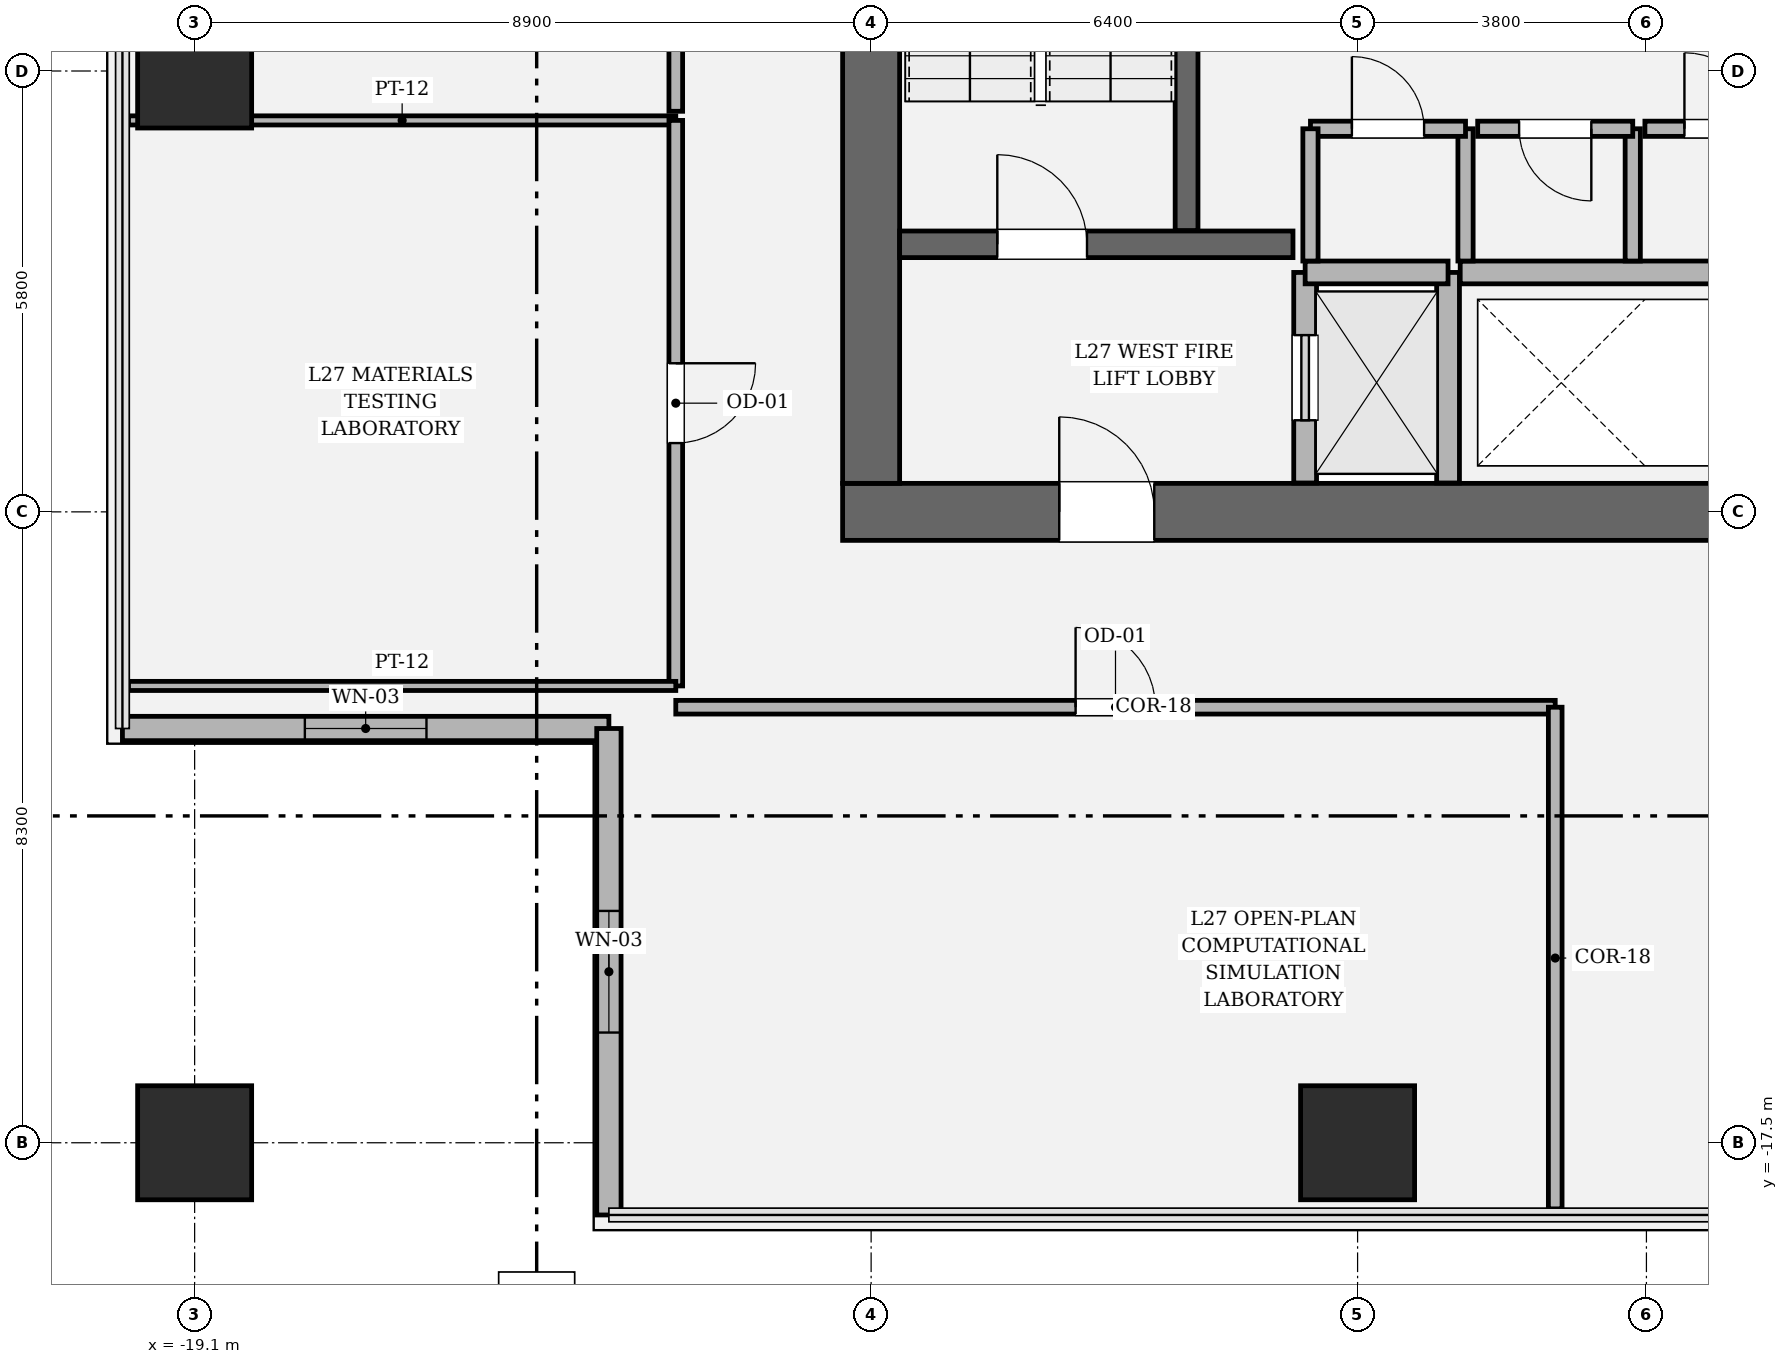
"""IFC4 building model, lengths in metres.
Left out: names, types, materials, properties, quantities, classifications, styles, units other than length and angle.
Written with IfcOpenShell. Run it as: python <this file> out.ifc"""

import sys

from ifc_helpers import new_model, si_unit, direction, frame, frame_2d, origin, origin_2d, place, context, subcontext, project, spatial, rectangle, hollow_rectangle, extrude, element, fill, save


model = new_model("IFC4")
c1 = context("Model", 3, precision=1e-05, world=origin(), true_north=direction((0.0, 1.0)))
c2 = subcontext(c1, "Body", "Model", "MODEL_VIEW")
j1 = project(units=[si_unit("LENGTHUNIT", "METRE"), si_unit("PLANEANGLEUNIT", "RADIAN")], contexts=[c1])
p1 = place(None, origin())
s1 = spatial("IfcSite", under=j1, at=p1, CompositionType="ELEMENT")
p2 = place(p1, origin())
s2 = spatial("IfcBuilding", under=s1, at=p2, CompositionType="ELEMENT")
p3 = place(p2, frame((0.0, 0.0, 117.3)))
s3 = spatial("IfcBuildingStorey", under=s2, at=p3, CompositionType="ELEMENT", Elevation=117.3)
p4 = place(p3, frame((10.575, -9.2, 0.0), z_axis=(0.0, 0.0, 1.0), x_axis=(-1.0, 0.0, 0.0)))
e1 = element("IfcWall", 1, at=p4, inside=s3, PredefinedType="SHEAR", context=c2, shape_type="SweptSolid", body=[
    extrude(rectangle(XDim=21.15, YDim=0.75, at=frame_2d((10.575, 0.0))), origin(), (0.0, 0.0, 1.0), 4.05),
])
p5 = place(p4, frame((2.85, 0.0, 0.0)))
e2 = element("IfcOpeningElement", 2, at=p5, cuts=e1, PredefinedType="OPENING", context=c2, shape_type="SweptSolid", body=[
    extrude(rectangle(XDim=1.25, YDim=2.25, at=frame_2d((0.625, 1.125))), frame((0.0, 0.385, 0.0), z_axis=(0.0, -1.0, 0.0), x_axis=(1.0, 0.0, 0.0)), (0.0, 0.0, 1.0), 0.77),
])
p6 = place(p4, frame((17.05, 0.0, 0.0)))
e3 = element("IfcOpeningElement", 3, at=p6, cuts=e1, PredefinedType="OPENING", context=c2, shape_type="SweptSolid", body=[
    extrude(rectangle(XDim=1.25, YDim=2.25, at=frame_2d((0.625, 1.125))), frame((0.0, 0.385, 0.0), z_axis=(0.0, -1.0, 0.0), x_axis=(1.0, 0.0, 0.0)), (0.0, 0.0, 1.0), 0.77),
])
p7 = place(p3, frame((-10.2, -8.825, 0.0), z_axis=(0.0, 0.0, 1.0), x_axis=(0.0, 1.0, 0.0)))
e4 = element("IfcWall", 4, at=p7, inside=s3, PredefinedType="SHEAR", context=c2, shape_type="SweptSolid", body=[
    extrude(rectangle(XDim=17.65, YDim=0.75, at=frame_2d((8.825, 0.0))), origin(), (0.0, 0.0, 1.0), 4.05),
])
p8 = place(p7, frame((12.615, 0.0, 0.0)))
e5 = element("IfcOpeningElement", 5, at=p8, cuts=e4, PredefinedType="OPENING", context=c2, shape_type="SweptSolid", body=[
    extrude(rectangle(XDim=1.18, YDim=2.2, at=frame_2d((0.59, 1.1))), frame((0.0, 0.385, 0.0), z_axis=(0.0, -1.0, 0.0), x_axis=(1.0, 0.0, 0.0)), (0.0, 0.0, 1.0), 0.77),
])
p9 = place(p3, frame((-6.05, -5.5, 0.0), z_axis=(0.0, 0.0, 1.0), x_axis=(0.0, 1.0, 0.0)))
e6 = element("IfcWall", 6, at=p9, inside=s3, PredefinedType="SOLIDWALL", context=c2, shape_type="SweptSolid", body=[
    extrude(rectangle(XDim=8.95, YDim=0.3, at=frame_2d((4.475, 0.0))), origin(), (0.0, 0.0, 1.0), 4.05),
])
p10 = place(p3, frame((-9.825, -5.68, 0.0), z_axis=(0.0, 0.0, 1.0), x_axis=(1.0, 0.0, 0.0)))
e7 = element("IfcWall", 7, at=p10, inside=s3, PredefinedType="SOLIDWALL", context=c2, shape_type="SweptSolid", body=[
    extrude(rectangle(XDim=5.175, YDim=0.35, at=frame_2d((2.587, 0.0))), origin(), (0.0, 0.0, 1.0), 4.05),
])
p11 = place(p10, frame((1.285, 0.0, 0.0)))
e8 = element("IfcOpeningElement", 8, at=p11, cuts=e7, PredefinedType="OPENING", context=c2, shape_type="SweptSolid", body=[
    extrude(rectangle(XDim=1.18, YDim=2.2, at=frame_2d((0.59, 1.1))), frame((0.0, 0.185, 0.0), z_axis=(0.0, -1.0, 0.0), x_axis=(1.0, 0.0, 0.0)), (0.0, 0.0, 1.0), 0.37),
])
for number, where, z_axis, x_axis in (
    (9, (-19.1, -17.5, 0.0), (0.0, 0.0, 1.0), (1.0, 0.0, 0.0)),
    (10, (-3.8, -17.5, 0.0), (0.0, 0.0, 1.0), (1.0, 0.0, 0.0)),
    (11, (-19.1, -3.4, 0.0), (0.0, 0.0, 1.0), (1.0, 0.0, 0.0)),
):
    element("IfcColumn", number, at=place(p3, frame(where, z_axis=z_axis, x_axis=x_axis)), inside=s3, PredefinedType="COLUMN", context=c2, shape_type="SweptSolid", body=[
        extrude(hollow_rectangle(XDim=1.5, YDim=1.5, WallThickness=0.045, at=origin_2d()), origin(), (0.0, 0.0, 1.0), 4.05),
    ])
p12 = place(p3, frame((-20.05, -12.05, 0.0), z_axis=(0.0, 0.0, 1.0), x_axis=(1.0, 0.0, 0.0)))
e12 = element("IfcWall", 12, at=p12, inside=s3, PredefinedType="SOLIDWALL", context=c2, shape_type="SweptSolid", body=[
    extrude(rectangle(XDim=6.4, YDim=0.32, at=frame_2d((3.2, 0.0))), origin(), (0.0, 0.0, 1.0), 3.104),
])
p13 = place(p12, frame((2.4, 0.0, 0.464)))
e13 = element("IfcOpeningElement", 13, at=p13, cuts=e12, PredefinedType="OPENING", context=c2, shape_type="SweptSolid", body=[
    extrude(rectangle(XDim=1.6, YDim=2.4, at=frame_2d((0.8, 1.2))), frame((0.0, 0.17, 0.0), z_axis=(0.0, -1.0, 0.0), x_axis=(1.0, 0.0, 0.0)), (0.0, 0.0, 1.0), 0.34),
])
p14 = place(p3, frame((-13.65, -12.05, 0.0), z_axis=(0.0, 0.0, 1.0), x_axis=(0.0, -1.0, 0.0)))
e14 = element("IfcWall", 14, at=p14, inside=s3, PredefinedType="SOLIDWALL", context=c2, shape_type="SweptSolid", body=[
    extrude(rectangle(XDim=6.4, YDim=0.32, at=frame_2d((3.2, 0.0))), origin(), (0.0, 0.0, 1.0), 3.104),
])
p15 = place(p14, frame((2.4, 0.0, 0.464)))
e15 = element("IfcOpeningElement", 15, at=p15, cuts=e14, PredefinedType="OPENING", context=c2, shape_type="SweptSolid", body=[
    extrude(rectangle(XDim=1.6, YDim=2.4, at=frame_2d((0.8, 1.2))), frame((0.0, 0.17, 0.0), z_axis=(0.0, -1.0, 0.0), x_axis=(1.0, 0.0, 0.0)), (0.0, 0.0, 1.0), 0.34),
])
p16 = place(p3, frame((-4.49, -8.82, 0.0), z_axis=(0.0, 0.0, 1.0), x_axis=(0.0, 1.0, 0.0)))
e16 = element("IfcWall", 16, at=p16, inside=s3, PredefinedType="SOLIDWALL", context=c2, shape_type="SweptSolid", body=[
    extrude(rectangle(XDim=2.77, YDim=0.3, at=frame_2d((1.385, 0.0))), origin(), (0.0, 0.0, 1.0), 3.81),
])
p17 = place(p16, frame((0.825, 0.0, 0.0)))
e17 = element("IfcOpeningElement", 17, at=p17, cuts=e16, PredefinedType="OPENING", context=c2, shape_type="SweptSolid", body=[
    extrude(rectangle(XDim=1.12, YDim=2.25, at=frame_2d((0.56, 1.125))), frame((0.0, 0.16, 0.0), z_axis=(0.0, -1.0, 0.0), x_axis=(1.0, 0.0, 0.0)), (0.0, 0.0, 1.0), 0.32),
])
p18 = place(p3, frame((-2.61, -8.82, 0.0), z_axis=(0.0, 0.0, 1.0), x_axis=(0.0, 1.0, 0.0)))
e18 = element("IfcWall", 18, at=p18, inside=s3, PredefinedType="SOLIDWALL", context=c2, shape_type="SweptSolid", body=[
    extrude(rectangle(XDim=2.77, YDim=0.3, at=frame_2d((1.385, 0.0))), origin(), (0.0, 0.0, 1.0), 3.81),
])
p19 = place(p3, frame((-4.49, -6.05, 0.0), z_axis=(0.0, 0.0, 1.0), x_axis=(1.0, 0.0, 0.0)))
e19 = element("IfcWall", 19, at=p19, inside=s3, PredefinedType="SOLIDWALL", context=c2, shape_type="SweptSolid", body=[
    extrude(rectangle(XDim=1.88, YDim=0.3, at=frame_2d((0.94, 0.0))), origin(), (0.0, 0.0, 1.0), 3.81),
])
p20 = place(p3, frame((-2.45, -6.05, 0.0), z_axis=(0.0, 0.0, 1.0), x_axis=(1.0, 0.0, 0.0)))
e20 = element("IfcWall", 20, at=p20, inside=s3, PredefinedType="SOLIDWALL", context=c2, shape_type="SweptSolid", body=[
    extrude(rectangle(XDim=4.9, YDim=0.3, at=frame_2d((2.45, 0.0))), origin(), (0.0, 0.0, 1.0), 3.81),
])
p21 = place(p3, frame((-2.38, -5.9, 0.0), z_axis=(0.0, 0.0, 1.0), x_axis=(0.0, 1.0, 0.0)))
e21 = element("IfcWall", 21, at=p21, inside=s3, PredefinedType="SOLIDWALL", context=c2, shape_type="SweptSolid", body=[
    extrude(rectangle(XDim=1.74, YDim=0.2, at=frame_2d((0.87, 0.0))), origin(), (0.0, 0.0, 1.0), 3.81),
])
p22 = place(p3, frame((-2.38, -4.16, 0.0), z_axis=(0.0, 0.0, 1.0), x_axis=(-1.0, 0.0, 0.0)))
e22 = element("IfcWall", 22, at=p22, inside=s3, PredefinedType="SOLIDWALL", context=c2, shape_type="SweptSolid", body=[
    extrude(rectangle(XDim=2.04, YDim=0.2, at=frame_2d((1.02, 0.0))), origin(), (0.0, 0.0, 1.0), 3.81),
])
p23 = place(p22, frame((0.545, 0.0, 0.0)))
e23 = element("IfcOpeningElement", 23, at=p23, cuts=e22, PredefinedType="OPENING", context=c2, shape_type="SweptSolid", body=[
    extrude(rectangle(XDim=0.95, YDim=2.15, at=frame_2d((0.475, 1.075))), frame((0.0, 0.11, 0.0), z_axis=(0.0, -1.0, 0.0), x_axis=(1.0, 0.0, 0.0)), (0.0, 0.0, 1.0), 0.22),
])
for number, where, z_axis, x_axis in (
    (24, (-4.42, -4.16, 0.0), (0.0, 0.0, 1.0), (0.0, -1.0, 0.0)),
    (25, (-0.18, -5.9, 0.0), (0.0, 0.0, 1.0), (0.0, 1.0, 0.0)),
):
    element("IfcWall", number, at=place(p3, frame(where, z_axis=z_axis, x_axis=x_axis)), inside=s3, PredefinedType="SOLIDWALL", context=c2, shape_type="SweptSolid", body=[
        extrude(rectangle(XDim=1.74, YDim=0.2, at=frame_2d((0.87, 0.0))), origin(), (0.0, 0.0, 1.0), 3.81),
    ])
p24 = place(p3, frame((-0.18, -4.16, 0.0), z_axis=(0.0, 0.0, 1.0), x_axis=(-1.0, 0.0, 0.0)))
e26 = element("IfcWall", 26, at=p24, inside=s3, PredefinedType="SOLIDWALL", context=c2, shape_type="SweptSolid", body=[
    extrude(rectangle(XDim=2.04, YDim=0.2, at=frame_2d((1.02, 0.0))), origin(), (0.0, 0.0, 1.0), 3.81),
])
p25 = place(p24, frame((0.545, 0.0, 0.0)))
e27 = element("IfcOpeningElement", 27, at=p25, cuts=e26, PredefinedType="OPENING", context=c2, shape_type="SweptSolid", body=[
    extrude(rectangle(XDim=0.95, YDim=2.15, at=frame_2d((0.475, 1.075))), frame((0.0, 0.11, 0.0), z_axis=(0.0, -1.0, 0.0), x_axis=(1.0, 0.0, 0.0)), (0.0, 0.0, 1.0), 0.22),
])
p26 = place(p3, frame((2.02, -4.16, 0.0), z_axis=(0.0, 0.0, 1.0), x_axis=(-1.0, 0.0, 0.0)))
e28 = element("IfcWall", 28, at=p26, inside=s3, PredefinedType="SOLIDWALL", context=c2, shape_type="SweptSolid", body=[
    extrude(rectangle(XDim=2.04, YDim=0.2, at=frame_2d((1.02, 0.0))), origin(), (0.0, 0.0, 1.0), 3.81),
])
p27 = place(p26, frame((0.52, 0.0, 0.0)))
e29 = element("IfcOpeningElement", 29, at=p27, cuts=e28, PredefinedType="OPENING", context=c2, shape_type="SweptSolid", body=[
    extrude(rectangle(XDim=1.0, YDim=2.15, at=frame_2d((0.5, 1.075))), frame((0.0, 0.11, 0.0), z_axis=(0.0, -1.0, 0.0), x_axis=(1.0, 0.0, 0.0)), (0.0, 0.0, 1.0), 0.22),
])
p28 = place(p3, frame((-12.77, -11.77, 0.0), z_axis=(0.0, 0.0, 1.0), x_axis=(1.0, 0.0, 0.0)))
e30 = element("IfcWall", 30, at=p28, inside=s3, PredefinedType="PARTITIONING", context=c2, shape_type="SweptSolid", body=[
    extrude(rectangle(XDim=11.57, YDim=0.18, at=frame_2d((5.785, 0.0))), origin(), (0.0, 0.0, 1.0), 3.104),
])
p29 = place(p28, frame((5.26, 0.0, 0.0)))
e31 = element("IfcOpeningElement", 31, at=p29, cuts=e30, PredefinedType="OPENING", context=c2, shape_type="SweptSolid", body=[
    extrude(rectangle(XDim=1.05, YDim=2.2, at=frame_2d((0.525, 1.1))), frame((0.0, 0.1, 0.0), z_axis=(0.0, -1.0, 0.0), x_axis=(1.0, 0.0, 0.0)), (0.0, 0.0, 1.0), 0.2),
])
p30 = place(p3, frame((-1.2, -11.77, 0.0), z_axis=(0.0, 0.0, 1.0), x_axis=(0.0, -1.0, 0.0)))
e32 = element("IfcWall", 32, at=p30, inside=s3, PredefinedType="PARTITIONING", context=c2, shape_type="SweptSolid", body=[
    extrude(rectangle(XDim=6.6, YDim=0.18, at=frame_2d((3.3, 0.0))), origin(), (0.0, 0.0, 1.0), 3.104),
])
p31 = place(p3, frame((-19.97, -4.05, 0.0), z_axis=(0.0, 0.0, 1.0), x_axis=(1.0, 0.0, 0.0)))
e33 = element("IfcWall", 33, at=p31, inside=s3, PredefinedType="PARTITIONING", context=c2, shape_type="SweptSolid", body=[
    extrude(rectangle(XDim=7.2, YDim=0.12, at=frame_2d((3.6, 0.0))), origin(), (0.0, 0.0, 1.0), 3.104),
])
p32 = place(p3, frame((-12.77, -4.05, 0.0), z_axis=(0.0, 0.0, 1.0), x_axis=(0.0, -1.0, 0.0)))
e34 = element("IfcWall", 34, at=p32, inside=s3, PredefinedType="PARTITIONING", context=c2, shape_type="SweptSolid", body=[
    extrude(rectangle(XDim=7.44, YDim=0.18, at=frame_2d((3.72, 0.0))), origin(), (0.0, 0.0, 1.0), 3.104),
])
p33 = place(p32, frame((3.195, 0.0, 0.0)))
e35 = element("IfcOpeningElement", 35, at=p33, cuts=e34, PredefinedType="OPENING", context=c2, shape_type="SweptSolid", body=[
    extrude(rectangle(XDim=1.05, YDim=2.2, at=frame_2d((0.525, 1.1))), frame((0.0, 0.1, 0.0), z_axis=(0.0, -1.0, 0.0), x_axis=(1.0, 0.0, 0.0)), (0.0, 0.0, 1.0), 0.2),
])
p34 = place(p3, frame((-12.77, -11.49, 0.0), z_axis=(0.0, 0.0, 1.0), x_axis=(-1.0, 0.0, 0.0)))
e36 = element("IfcWall", 36, at=p34, inside=s3, PredefinedType="PARTITIONING", context=c2, shape_type="SweptSolid", body=[
    extrude(rectangle(XDim=7.2, YDim=0.12, at=frame_2d((3.6, 0.0))), origin(), (0.0, 0.0, 1.0), 3.104),
])
p35 = place(p3, frame((-12.77, 1.89, 0.0), z_axis=(0.0, 0.0, 1.0), x_axis=(0.0, -1.0, 0.0)))
e37 = element("IfcWall", 37, at=p35, inside=s3, PredefinedType="PARTITIONING", context=c2, shape_type="SweptSolid", body=[
    extrude(rectangle(XDim=5.82, YDim=0.18, at=frame_2d((2.91, 0.0))), origin(), (0.0, 0.0, 1.0), 3.104),
])
p36 = place(p35, frame((2.385, 0.0, 0.0)))
e38 = element("IfcOpeningElement", 38, at=p36, cuts=e37, PredefinedType="OPENING", context=c2, shape_type="SweptSolid", body=[
    extrude(rectangle(XDim=1.05, YDim=2.2, at=frame_2d((0.525, 1.1))), frame((0.0, 0.1, 0.0), z_axis=(0.0, -1.0, 0.0), x_axis=(1.0, 0.0, 0.0)), (0.0, 0.0, 1.0), 0.2),
])
p37 = place(p13, origin())
e39 = element("IfcWindow", 39, at=p37, inside=s3, PartitioningType="SINGLE_PANEL", PredefinedType="WINDOW", context=c2, shape_type="SweptSolid", body=[
    extrude(rectangle(XDim=1.6, YDim=2.4, at=frame_2d((0.8, 1.2))), frame((0.0, 0.03, 0.0), z_axis=(0.0, -1.0, 0.0), x_axis=(1.0, 0.0, 0.0)), (0.0, 0.0, 1.0), 0.06),
])
fill(e13, e39)
p38 = place(p15, origin())
e40 = element("IfcWindow", 40, at=p38, inside=s3, PartitioningType="SINGLE_PANEL", PredefinedType="WINDOW", context=c2, shape_type="SweptSolid", body=[
    extrude(rectangle(XDim=1.6, YDim=2.4, at=frame_2d((0.8, 1.2))), frame((0.0, 0.03, 0.0), z_axis=(0.0, -1.0, 0.0), x_axis=(1.0, 0.0, 0.0)), (0.0, 0.0, 1.0), 0.06),
])
fill(e15, e40)
p39 = place(p11, origin())
e41 = element("IfcDoor", 41, at=p39, inside=s3, OperationType="SINGLE_SWING_LEFT", PredefinedType="DOOR", context=c2, shape_type="SweptSolid", body=[
    extrude(rectangle(XDim=1.18, YDim=2.2, at=frame_2d((0.59, 1.1))), frame((0.0, 0.025, 0.0), z_axis=(0.0, -1.0, 0.0), x_axis=(1.0, 0.0, 0.0)), (0.0, 0.0, 1.0), 0.05),
])
fill(e8, e41)
p40 = place(p6, origin())
e42 = element("IfcDoor", 42, at=p40, inside=s3, OperationType="SINGLE_SWING_RIGHT", PredefinedType="DOOR", context=c2, shape_type="SweptSolid", body=[
    extrude(rectangle(XDim=1.25, YDim=2.25, at=frame_2d((0.625, 1.125))), frame((0.0, 0.025, 0.0), z_axis=(0.0, -1.0, 0.0), x_axis=(1.0, 0.0, 0.0)), (0.0, 0.0, 1.0), 0.05),
])
fill(e3, e42)
p41 = place(p17, origin())
e43 = element("IfcDoor", 43, at=p41, inside=s3, OperationType="SLIDING_TO_LEFT", PredefinedType="DOOR", context=c2, shape_type="SweptSolid", body=[
    extrude(rectangle(XDim=1.12, YDim=2.25, at=frame_2d((0.56, 1.125))), frame((0.0, 0.025, 0.0), z_axis=(0.0, -1.0, 0.0), x_axis=(1.0, 0.0, 0.0)), (0.0, 0.0, 1.0), 0.05),
])
fill(e17, e43)
p42 = place(p23, origin())
e44 = element("IfcDoor", 44, at=p42, inside=s3, OperationType="SINGLE_SWING_RIGHT", PredefinedType="DOOR", context=c2, shape_type="SweptSolid", body=[
    extrude(rectangle(XDim=0.95, YDim=2.15, at=frame_2d((0.475, 1.075))), frame((0.0, 0.025, 0.0), z_axis=(0.0, -1.0, 0.0), x_axis=(1.0, 0.0, 0.0)), (0.0, 0.0, 1.0), 0.05),
])
fill(e23, e44)
p43 = place(p25, origin())
e45 = element("IfcDoor", 45, at=p43, inside=s3, OperationType="SINGLE_SWING_LEFT", PredefinedType="DOOR", context=c2, shape_type="SweptSolid", body=[
    extrude(rectangle(XDim=0.95, YDim=2.15, at=frame_2d((0.475, 1.075))), frame((0.0, 0.025, 0.0), z_axis=(0.0, -1.0, 0.0), x_axis=(1.0, 0.0, 0.0)), (0.0, 0.0, 1.0), 0.05),
])
fill(e27, e45)
p44 = place(p27, origin())
e46 = element("IfcDoor", 46, at=p44, inside=s3, OperationType="SINGLE_SWING_RIGHT", PredefinedType="DOOR", context=c2, shape_type="SweptSolid", body=[
    extrude(rectangle(XDim=1.0, YDim=2.15, at=frame_2d((0.5, 1.075))), frame((0.0, 0.025, 0.0), z_axis=(0.0, -1.0, 0.0), x_axis=(1.0, 0.0, 0.0)), (0.0, 0.0, 1.0), 0.05),
])
fill(e29, e46)
p45 = place(p29, origin())
e47 = element("IfcDoor", 47, at=p45, inside=s3, OperationType="SINGLE_SWING_LEFT", PredefinedType="DOOR", context=c2, shape_type="SweptSolid", body=[
    extrude(rectangle(XDim=1.05, YDim=2.2, at=frame_2d((0.525, 1.1))), frame((0.0, 0.025, 0.0), z_axis=(0.0, -1.0, 0.0), x_axis=(1.0, 0.0, 0.0)), (0.0, 0.0, 1.0), 0.05),
])
fill(e31, e47)
p46 = place(p33, origin())
e48 = element("IfcDoor", 48, at=p46, inside=s3, OperationType="SINGLE_SWING_LEFT", PredefinedType="DOOR", context=c2, shape_type="SweptSolid", body=[
    extrude(rectangle(XDim=1.05, YDim=2.2, at=frame_2d((0.525, 1.1))), frame((0.0, 0.025, 0.0), z_axis=(0.0, -1.0, 0.0), x_axis=(1.0, 0.0, 0.0)), (0.0, 0.0, 1.0), 0.05),
])
fill(e35, e48)
save(model, sys.argv[1])
